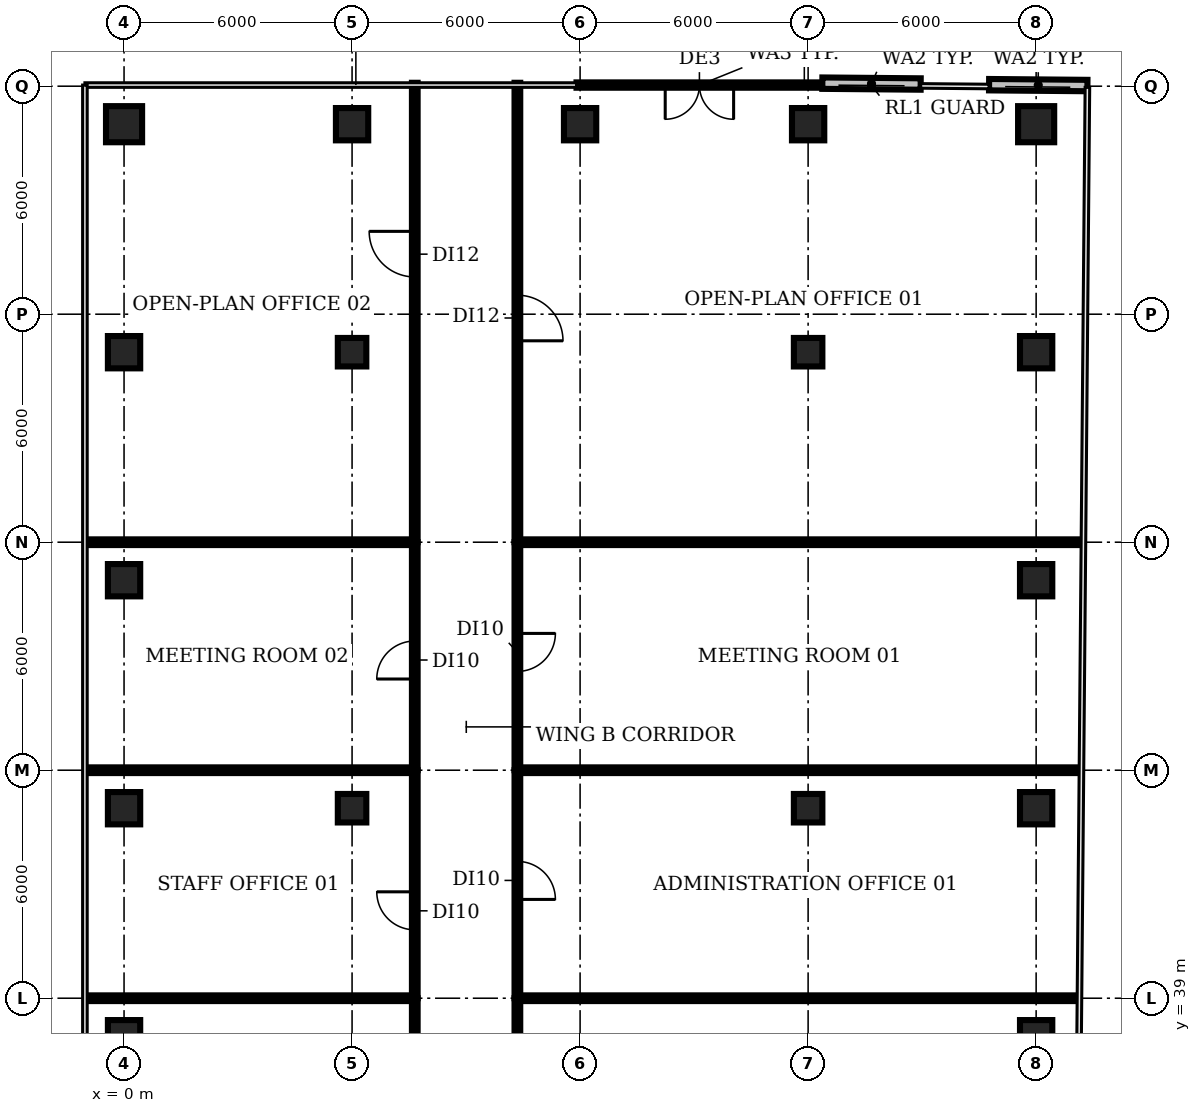
"""IFC4 building model, lengths in metres.
Left out: names, types, materials, properties, quantities, classifications, styles, units other than length and angle.
Written with IfcOpenShell. Run it as: python <this file> out.ifc"""

import sys

from ifc_helpers import new_model, si_unit, direction, frame, frame_2d, origin, origin_2d, place, context, subcontext, project, spatial, rectangle, circle, extrude, element, fill, save


model = new_model("IFC4")
c1 = context("Model", 3, precision=1e-05, world=origin(), true_north=direction((0.0, 1.0)))
c2 = subcontext(c1, "Body", "Model", "MODEL_VIEW")
j1 = project(units=[si_unit("LENGTHUNIT", "METRE"), si_unit("PLANEANGLEUNIT", "RADIAN")], contexts=[c1])
p1 = place(None, origin())
s1 = spatial("IfcSite", under=j1, at=p1, CompositionType="ELEMENT")
p2 = place(p1, origin())
s2 = spatial("IfcBuilding", under=s1, at=p2, CompositionType="ELEMENT")
p3 = place(p2, frame((0.0, 0.0, 167.6)))
s3 = spatial("IfcBuildingStorey", under=s2, at=p3, CompositionType="ELEMENT", Elevation=167.6)
for number, where, z_axis, x_axis in (
    (1, (0.0, 38.0, 0.0), (0.0, 0.0, 1.0), (1.0, 0.0, 0.0)),
    (2, (0.0, 44.0, 0.0), (0.0, 0.0, 1.0), (1.0, 0.0, 0.0)),
    (3, (0.0, 50.0, 0.0), (0.0, 0.0, 1.0), (1.0, 0.0, 0.0)),
    (4, (0.0, 56.0, 0.0), (0.0, 0.0, 1.0), (1.0, 0.0, 0.0)),
):
    element("IfcColumn", number, at=place(p3, frame(where, z_axis=z_axis, x_axis=x_axis)), inside=s3, PredefinedType="COLUMN", context=c2, shape_type="SweptSolid", body=[
        extrude(rectangle(XDim=0.85, YDim=0.85, at=origin_2d()), origin(), (0.0, 0.0, 1.0), 3.85),
    ])
p4 = place(p3, frame((0.0, 62.0, 0.0), z_axis=(0.0, 0.0, 1.0), x_axis=(1.0, 0.0, 0.0)))
e5 = element("IfcColumn", 5, at=p4, inside=s3, PredefinedType="COLUMN", context=c2, shape_type="SweptSolid", body=[
    extrude(circle(Radius=0.475, at=origin_2d()), origin(), (0.0, 0.0, 1.0), 3.85),
])
for number, where, z_axis, x_axis in (
    (6, (6.0, 44.0, 0.0), (0.0, 0.0, 1.0), (1.0, 0.0, 0.0)),
    (7, (6.0, 56.0, 0.0), (0.0, 0.0, 1.0), (1.0, 0.0, 0.0)),
):
    element("IfcColumn", number, at=place(p3, frame(where, z_axis=z_axis, x_axis=x_axis)), inside=s3, PredefinedType="COLUMN", context=c2, shape_type="SweptSolid", body=[
        extrude(rectangle(XDim=0.75, YDim=0.75, at=origin_2d()), origin(), (0.0, 0.0, 1.0), 3.85),
    ])
for number, where, z_axis, x_axis in (
    (8, (6.0, 62.0, 0.0), (0.0, 0.0, 1.0), (1.0, 0.0, 0.0)),
    (9, (12.0, 62.0, 0.0), (0.0, 0.0, 1.0), (1.0, 0.0, 0.0)),
):
    element("IfcColumn", number, at=place(p3, frame(where, z_axis=z_axis, x_axis=x_axis)), inside=s3, PredefinedType="COLUMN", context=c2, shape_type="SweptSolid", body=[
        extrude(rectangle(XDim=0.85, YDim=0.85, at=origin_2d()), origin(), (0.0, 0.0, 1.0), 3.85),
    ])
for number, where, z_axis, x_axis in (
    (10, (18.0, 44.0, 0.0), (0.0, 0.0, 1.0), (1.0, 0.0, 0.0)),
    (11, (18.0, 56.0, 0.0), (0.0, 0.0, 1.0), (1.0, 0.0, 0.0)),
):
    element("IfcColumn", number, at=place(p3, frame(where, z_axis=z_axis, x_axis=x_axis)), inside=s3, PredefinedType="COLUMN", context=c2, shape_type="SweptSolid", body=[
        extrude(rectangle(XDim=0.75, YDim=0.75, at=origin_2d()), origin(), (0.0, 0.0, 1.0), 3.85),
    ])
for number, where, z_axis, x_axis in (
    (12, (18.0, 62.0, 0.0), (0.0, 0.0, 1.0), (1.0, 0.0, 0.0)),
    (13, (24.0, 38.0, 0.0), (0.0, 0.0, 1.0), (1.0, 0.0, 0.0)),
    (14, (24.0, 44.0, 0.0), (0.0, 0.0, 1.0), (1.0, 0.0, 0.0)),
    (15, (24.0, 50.0, 0.0), (0.0, 0.0, 1.0), (1.0, 0.0, 0.0)),
    (16, (24.0, 56.0, 0.0), (0.0, 0.0, 1.0), (1.0, 0.0, 0.0)),
):
    element("IfcColumn", number, at=place(p3, frame(where, z_axis=z_axis, x_axis=x_axis)), inside=s3, PredefinedType="COLUMN", context=c2, shape_type="SweptSolid", body=[
        extrude(rectangle(XDim=0.85, YDim=0.85, at=origin_2d()), origin(), (0.0, 0.0, 1.0), 3.85),
    ])
p5 = place(p3, frame((24.0, 62.0, 0.0), z_axis=(0.0, 0.0, 1.0), x_axis=(1.0, 0.0, 0.0)))
e17 = element("IfcColumn", 17, at=p5, inside=s3, PredefinedType="COLUMN", context=c2, shape_type="SweptSolid", body=[
    extrude(circle(Radius=0.475, at=origin_2d()), origin(), (0.0, 0.0, 1.0), 3.85),
])
p6 = place(p3, frame((18.374, 63.03, 0.0), z_axis=(0.0, 0.0, 1.0), x_axis=(-1.0, 0.0, 0.0)))
e18 = element("IfcWall", 18, at=p6, inside=s3, PredefinedType="SOLIDWALL", context=c2, shape_type="SweptSolid", body=[
    extrude(rectangle(XDim=6.468, YDim=0.14, at=frame_2d((3.234, 0.0))), origin(), (0.0, 0.0, 1.0), 3.85),
])
p7 = place(p6, frame((2.334, 0.0, 0.0)))
e19 = element("IfcOpeningElement", 19, at=p7, cuts=e18, PredefinedType="OPENING", context=c2, shape_type="SweptSolid", body=[
    extrude(rectangle(XDim=1.8, YDim=2.4, at=frame_2d((0.9, 1.2))), frame((0.0, 0.08, 0.0), z_axis=(0.0, -1.0, 0.0), x_axis=(1.0, 0.0, 0.0)), (0.0, 0.0, 1.0), 0.16),
])
for number, where, z_axis, x_axis in (
    (20, (25.349, 63.017, 0.0), (0.0, 0.0, 1.0), (-1.0, 0.009, 0.0)),
    (21, (20.962, 63.057, 0.0), (0.0, 0.0, 1.0), (-1.0, 0.009, 0.0)),
):
    element("IfcWall", number, at=place(p3, frame(where, z_axis=z_axis, x_axis=x_axis)), inside=s3, PredefinedType="SOLIDWALL", context=c2, shape_type="SweptSolid", body=[
        extrude(rectangle(XDim=2.588, YDim=0.3, at=frame_2d((1.294, 0.0))), origin(), (0.0, 0.0, 1.0), 3.85),
    ])
for number, where, z_axis, x_axis in (
    (22, (-0.98, 39.0, 0.0), (0.0, 0.0, 1.0), (1.0, 0.0, 0.0)),
    (23, (-0.98, 45.0, 0.0), (0.0, 0.0, 1.0), (1.0, 0.0, 0.0)),
):
    element("IfcWall", number, at=place(p3, frame(where, z_axis=z_axis, x_axis=x_axis)), inside=s3, PredefinedType="PARTITIONING", context=c2, shape_type="SweptSolid", body=[
        extrude(rectangle(XDim=8.63, YDim=0.15, at=frame_2d((4.315, 0.0))), origin(), (0.0, 0.0, 1.0), 2.88),
    ])
p8 = place(p3, frame((-0.965, 51.0, 0.0), z_axis=(0.0, 0.0, 1.0), x_axis=(1.0, 0.0, 0.0)))
e24 = element("IfcWall", 24, at=p8, inside=s3, PredefinedType="PARTITIONING", context=c2, shape_type="SweptSolid", body=[
    extrude(rectangle(XDim=8.615, YDim=0.15, at=frame_2d((4.308, 0.0))), origin(), (0.0, 0.0, 1.0), 2.88),
])
p9 = place(p3, frame((7.65, 34.1, 0.0), z_axis=(0.0, 0.0, 1.0), x_axis=(0.0, 1.0, 0.0)))
e25 = element("IfcWall", 25, at=p9, inside=s3, PredefinedType="PARTITIONING", context=c2, shape_type="SweptSolid", body=[
    extrude(rectangle(XDim=4.9, YDim=0.15, at=frame_2d((2.45, 0.0))), origin(), (0.0, 0.0, 1.0), 2.88),
])
p10 = place(p9, frame((1.9, 0.0, 0.0)))
e26 = element("IfcOpeningElement", 26, at=p10, cuts=e25, PredefinedType="OPENING", context=c2, shape_type="SweptSolid", body=[
    extrude(rectangle(XDim=1.0, YDim=2.1, at=frame_2d((0.5, 1.05))), frame((0.0, 0.085, 0.0), z_axis=(0.0, -1.0, 0.0), x_axis=(1.0, 0.0, 0.0)), (0.0, 0.0, 1.0), 0.17),
])
p11 = place(p3, frame((7.65, 39.0, 0.0), z_axis=(0.0, 0.0, 1.0), x_axis=(0.0, 1.0, 0.0)))
e27 = element("IfcWall", 27, at=p11, inside=s3, PredefinedType="PARTITIONING", context=c2, shape_type="SweptSolid", body=[
    extrude(rectangle(XDim=6.0, YDim=0.15, at=frame_2d((3.0, 0.0))), origin(), (0.0, 0.0, 1.0), 2.88),
])
p12 = place(p11, frame((1.8, 0.0, 0.0)))
e28 = element("IfcOpeningElement", 28, at=p12, cuts=e27, PredefinedType="OPENING", context=c2, shape_type="SweptSolid", body=[
    extrude(rectangle(XDim=1.0, YDim=2.1, at=frame_2d((0.5, 1.05))), frame((0.0, 0.085, 0.0), z_axis=(0.0, -1.0, 0.0), x_axis=(1.0, 0.0, 0.0)), (0.0, 0.0, 1.0), 0.17),
])
p13 = place(p3, frame((7.65, 45.0, 0.0), z_axis=(0.0, 0.0, 1.0), x_axis=(0.0, 1.0, 0.0)))
e29 = element("IfcWall", 29, at=p13, inside=s3, PredefinedType="PARTITIONING", context=c2, shape_type="SweptSolid", body=[
    extrude(rectangle(XDim=6.0, YDim=0.15, at=frame_2d((3.0, 0.0))), origin(), (0.0, 0.0, 1.0), 2.88),
])
p14 = place(p13, frame((2.4, 0.0, 0.0)))
e30 = element("IfcOpeningElement", 30, at=p14, cuts=e29, PredefinedType="OPENING", context=c2, shape_type="SweptSolid", body=[
    extrude(rectangle(XDim=1.0, YDim=2.1, at=frame_2d((0.5, 1.05))), frame((0.0, 0.085, 0.0), z_axis=(0.0, -1.0, 0.0), x_axis=(1.0, 0.0, 0.0)), (0.0, 0.0, 1.0), 0.17),
])
p15 = place(p3, frame((7.65, 51.0, 0.0), z_axis=(0.0, 0.0, 1.0), x_axis=(0.0, 1.0, 0.0)))
e31 = element("IfcWall", 31, at=p15, inside=s3, PredefinedType="PARTITIONING", context=c2, shape_type="SweptSolid", body=[
    extrude(rectangle(XDim=12.09, YDim=0.15, at=frame_2d((6.045, 0.0))), origin(), (0.0, 0.0, 1.0), 2.88),
])
p16 = place(p15, frame((6.98, 0.0, 0.0)))
e32 = element("IfcOpeningElement", 32, at=p16, cuts=e31, PredefinedType="OPENING", context=c2, shape_type="SweptSolid", body=[
    extrude(rectangle(XDim=1.2, YDim=2.1, at=frame_2d((0.6, 1.05))), frame((0.0, 0.085, 0.0), z_axis=(0.0, -1.0, 0.0), x_axis=(1.0, 0.0, 0.0)), (0.0, 0.0, 1.0), 0.17),
])
p17 = place(p3, frame((10.35, 39.0, 0.0), z_axis=(0.0, 0.0, 1.0), x_axis=(0.0, -1.0, 0.0)))
e33 = element("IfcWall", 33, at=p17, inside=s3, PredefinedType="PARTITIONING", context=c2, shape_type="SweptSolid", body=[
    extrude(rectangle(XDim=4.9, YDim=0.15, at=frame_2d((2.45, 0.0))), origin(), (0.0, 0.0, 1.0), 2.88),
])
p18 = place(p17, frame((1.9, 0.0, 0.0)))
e34 = element("IfcOpeningElement", 34, at=p18, cuts=e33, PredefinedType="OPENING", context=c2, shape_type="SweptSolid", body=[
    extrude(rectangle(XDim=1.0, YDim=2.1, at=frame_2d((0.5, 1.05))), frame((0.0, 0.085, 0.0), z_axis=(0.0, -1.0, 0.0), x_axis=(1.0, 0.0, 0.0)), (0.0, 0.0, 1.0), 0.17),
])
p19 = place(p3, frame((10.35, 39.0, 0.0), z_axis=(0.0, 0.0, 1.0), x_axis=(1.0, 0.0, 0.0)))
e35 = element("IfcWall", 35, at=p19, inside=s3, PredefinedType="PARTITIONING", context=c2, shape_type="SweptSolid", body=[
    extrude(rectangle(XDim=14.74, YDim=0.15, at=frame_2d((7.37, 0.0))), origin(), (0.0, 0.0, 1.0), 2.88),
])
p20 = place(p3, frame((10.35, 45.0, 0.0), z_axis=(0.0, 0.0, 1.0), x_axis=(0.0, -1.0, 0.0)))
e36 = element("IfcWall", 36, at=p20, inside=s3, PredefinedType="PARTITIONING", context=c2, shape_type="SweptSolid", body=[
    extrude(rectangle(XDim=6.0, YDim=0.15, at=frame_2d((3.0, 0.0))), origin(), (0.0, 0.0, 1.0), 2.88),
])
p21 = place(p20, frame((2.4, 0.0, 0.0)))
e37 = element("IfcOpeningElement", 37, at=p21, cuts=e36, PredefinedType="OPENING", context=c2, shape_type="SweptSolid", body=[
    extrude(rectangle(XDim=1.0, YDim=2.1, at=frame_2d((0.5, 1.05))), frame((0.0, 0.085, 0.0), z_axis=(0.0, -1.0, 0.0), x_axis=(1.0, 0.0, 0.0)), (0.0, 0.0, 1.0), 0.17),
])
p22 = place(p3, frame((10.35, 45.0, 0.0), z_axis=(0.0, 0.0, 1.0), x_axis=(1.0, 0.0, 0.0)))
e38 = element("IfcWall", 38, at=p22, inside=s3, PredefinedType="PARTITIONING", context=c2, shape_type="SweptSolid", body=[
    extrude(rectangle(XDim=14.79, YDim=0.15, at=frame_2d((7.395, 0.0))), origin(), (0.0, 0.0, 1.0), 2.88),
])
p23 = place(p3, frame((10.35, 51.0, 0.0), z_axis=(0.0, 0.0, 1.0), x_axis=(0.0, -1.0, 0.0)))
e39 = element("IfcWall", 39, at=p23, inside=s3, PredefinedType="PARTITIONING", context=c2, shape_type="SweptSolid", body=[
    extrude(rectangle(XDim=6.0, YDim=0.15, at=frame_2d((3.0, 0.0))), origin(), (0.0, 0.0, 1.0), 2.88),
])
p24 = place(p23, frame((2.4, 0.0, 0.0)))
e40 = element("IfcOpeningElement", 40, at=p24, cuts=e39, PredefinedType="OPENING", context=c2, shape_type="SweptSolid", body=[
    extrude(rectangle(XDim=1.0, YDim=2.1, at=frame_2d((0.5, 1.05))), frame((0.0, 0.085, 0.0), z_axis=(0.0, -1.0, 0.0), x_axis=(1.0, 0.0, 0.0)), (0.0, 0.0, 1.0), 0.17),
])
p25 = place(p3, frame((10.35, 51.0, 0.0), z_axis=(0.0, 0.0, 1.0), x_axis=(1.0, 0.0, 0.0)))
e41 = element("IfcWall", 41, at=p25, inside=s3, PredefinedType="PARTITIONING", context=c2, shape_type="SweptSolid", body=[
    extrude(rectangle(XDim=14.84, YDim=0.15, at=frame_2d((7.42, 0.0))), origin(), (0.0, 0.0, 1.0), 2.88),
])
p26 = place(p3, frame((10.35, 63.09, 0.0), z_axis=(0.0, 0.0, 1.0), x_axis=(0.0, -1.0, 0.0)))
e42 = element("IfcWall", 42, at=p26, inside=s3, PredefinedType="PARTITIONING", context=c2, shape_type="SweptSolid", body=[
    extrude(rectangle(XDim=12.09, YDim=0.15, at=frame_2d((6.045, 0.0))), origin(), (0.0, 0.0, 1.0), 2.88),
])
p27 = place(p26, frame((5.59, 0.0, 0.0)))
e43 = element("IfcOpeningElement", 43, at=p27, cuts=e42, PredefinedType="OPENING", context=c2, shape_type="SweptSolid", body=[
    extrude(rectangle(XDim=1.2, YDim=2.1, at=frame_2d((0.6, 1.05))), frame((0.0, 0.085, 0.0), z_axis=(0.0, -1.0, 0.0), x_axis=(1.0, 0.0, 0.0)), (0.0, 0.0, 1.0), 0.17),
])
p28 = place(p7, origin())
e44 = element("IfcDoor", 44, at=p28, inside=s3, OperationType="DOUBLE_DOOR_DOUBLE_SWING", PredefinedType="DOOR", context=c2, shape_type="SweptSolid", body=[
    extrude(rectangle(XDim=1.8, YDim=2.4, at=frame_2d((0.9, 1.2))), frame((0.0, 0.025, 0.0), z_axis=(0.0, -1.0, 0.0), x_axis=(1.0, 0.0, 0.0)), (0.0, 0.0, 1.0), 0.05),
])
fill(e19, e44)
p29 = place(p12, origin())
e45 = element("IfcDoor", 45, at=p29, inside=s3, OperationType="SINGLE_SWING_RIGHT", PredefinedType="DOOR", context=c2, shape_type="SweptSolid", body=[
    extrude(rectangle(XDim=1.0, YDim=2.1, at=frame_2d((0.5, 1.05))), frame((0.0, 0.025, 0.0), z_axis=(0.0, -1.0, 0.0), x_axis=(1.0, 0.0, 0.0)), (0.0, 0.0, 1.0), 0.05),
])
fill(e28, e45)
p30 = place(p14, origin())
e46 = element("IfcDoor", 46, at=p30, inside=s3, OperationType="SINGLE_SWING_LEFT", PredefinedType="DOOR", context=c2, shape_type="SweptSolid", body=[
    extrude(rectangle(XDim=1.0, YDim=2.1, at=frame_2d((0.5, 1.05))), frame((0.0, 0.025, 0.0), z_axis=(0.0, -1.0, 0.0), x_axis=(1.0, 0.0, 0.0)), (0.0, 0.0, 1.0), 0.05),
])
fill(e30, e46)
p31 = place(p16, origin())
e47 = element("IfcDoor", 47, at=p31, inside=s3, OperationType="SINGLE_SWING_RIGHT", PredefinedType="DOOR", context=c2, shape_type="SweptSolid", body=[
    extrude(rectangle(XDim=1.2, YDim=2.1, at=frame_2d((0.6, 1.05))), frame((0.0, 0.025, 0.0), z_axis=(0.0, -1.0, 0.0), x_axis=(1.0, 0.0, 0.0)), (0.0, 0.0, 1.0), 0.05),
])
fill(e32, e47)
p32 = place(p21, origin())
e48 = element("IfcDoor", 48, at=p32, inside=s3, OperationType="SINGLE_SWING_RIGHT", PredefinedType="DOOR", context=c2, shape_type="SweptSolid", body=[
    extrude(rectangle(XDim=1.0, YDim=2.1, at=frame_2d((0.5, 1.05))), frame((0.0, 0.025, 0.0), z_axis=(0.0, -1.0, 0.0), x_axis=(1.0, 0.0, 0.0)), (0.0, 0.0, 1.0), 0.05),
])
fill(e37, e48)
p33 = place(p24, origin())
e49 = element("IfcDoor", 49, at=p33, inside=s3, OperationType="SINGLE_SWING_LEFT", PredefinedType="DOOR", context=c2, shape_type="SweptSolid", body=[
    extrude(rectangle(XDim=1.0, YDim=2.1, at=frame_2d((0.5, 1.05))), frame((0.0, 0.025, 0.0), z_axis=(0.0, -1.0, 0.0), x_axis=(1.0, 0.0, 0.0)), (0.0, 0.0, 1.0), 0.05),
])
fill(e40, e49)
p34 = place(p27, origin())
e50 = element("IfcDoor", 50, at=p34, inside=s3, OperationType="SINGLE_SWING_RIGHT", PredefinedType="DOOR", context=c2, shape_type="SweptSolid", body=[
    extrude(rectangle(XDim=1.2, YDim=2.1, at=frame_2d((0.6, 1.05))), frame((0.0, 0.025, 0.0), z_axis=(0.0, -1.0, 0.0), x_axis=(1.0, 0.0, 0.0)), (0.0, 0.0, 1.0), 0.05),
])
fill(e43, e50)
save(model, sys.argv[1])
